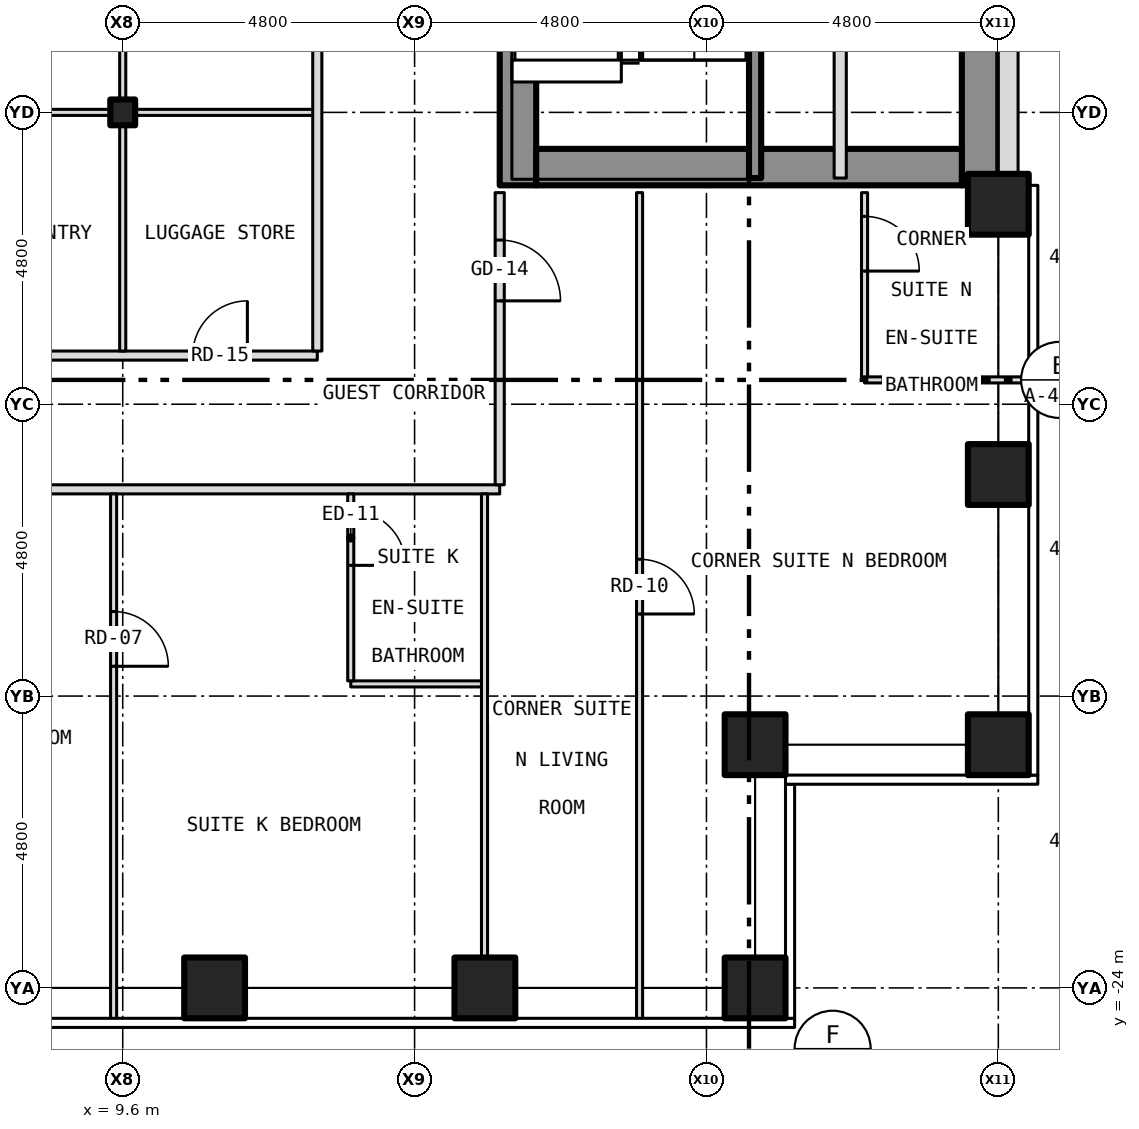
"""IFC4 building model, lengths in metres.
Left out: names, types, materials, properties, quantities, classifications, styles, units other than length and angle.
Written with IfcOpenShell. Run it as: python <this file> out.ifc"""

import sys

from ifc_helpers import new_model, si_unit, direction, frame, frame_2d, origin, origin_2d, place, context, subcontext, project, spatial, rectangle, hollow_rectangle, i_section, extrude, element, fill, save


model = new_model("IFC4")
c1 = context("Model", 3, precision=1e-05, world=origin(), true_north=direction((0.0, 1.0)))
c2 = subcontext(c1, "Body", "Model", "MODEL_VIEW")
j1 = project(units=[si_unit("LENGTHUNIT", "METRE"), si_unit("PLANEANGLEUNIT", "RADIAN")], contexts=[c1])
p1 = place(None, origin())
s1 = spatial("IfcSite", under=j1, at=p1, CompositionType="ELEMENT")
p2 = place(p1, origin())
s2 = spatial("IfcBuilding", under=s1, at=p2, CompositionType="ELEMENT")
p3 = place(p2, frame((0.0, 0.0, 56.5)))
s3 = spatial("IfcBuildingStorey", under=s2, at=p3, CompositionType="ELEMENT", Elevation=56.5)
for number, where, z_axis, x_axis in (
    (1, (11.111, -24.0, -0.15), (0.0, 0.0, 1.0), (1.0, 0.0, 0.0)),
    (2, (15.556, -24.0, -0.15), (0.0, 0.0, 1.0), (1.0, 0.0, 0.0)),
    (3, (20.0, -24.0, -0.15), (0.0, 0.0, 1.0), (1.0, 0.0, 0.0)),
    (4, (24.0, -20.0, -0.15), (0.0, 0.0, 1.0), (1.0, 0.0, 0.0)),
    (5, (24.0, -15.556, -0.15), (0.0, 0.0, 1.0), (1.0, 0.0, 0.0)),
    (6, (24.0, -11.111, -0.15), (0.0, 0.0, 1.0), (1.0, 0.0, 0.0)),
    (7, (20.0, -20.0, -0.15), (0.0, 0.0, 1.0), (1.0, 0.0, 0.0)),
):
    element("IfcColumn", number, at=place(p3, frame(where, z_axis=z_axis, x_axis=x_axis)), inside=s3, PredefinedType="COLUMN", context=c2, shape_type="SweptSolid", body=[
        extrude(hollow_rectangle(XDim=1.0, YDim=1.0, WallThickness=0.06, at=origin_2d()), origin(), (0.0, 0.0, 1.0), 3.5),
    ])
p4 = place(p3, frame((9.6, -9.6, -0.15), z_axis=(0.0, 0.0, 1.0), x_axis=(1.0, 0.0, 0.0)))
e8 = element("IfcColumn", 8, at=p4, inside=s3, PredefinedType="COLUMN", context=c2, shape_type="SweptSolid", body=[
    extrude(i_section(OverallWidth=0.409, OverallDepth=0.424, WebThickness=0.033, FlangeThickness=0.052, at=origin_2d()), origin(), (0.0, 0.0, 1.0), 3.5),
])
p5 = place(p3, frame((16.1, -10.8, 0.0), z_axis=(0.0, 0.0, 1.0), x_axis=(0.0, 1.0, 0.0)))
e9 = element("IfcWall", 9, at=p5, inside=s3, PredefinedType="SHEAR", context=c2, shape_type="SweptSolid", body=[
    extrude(rectangle(XDim=21.6, YDim=0.6, at=frame_2d((10.8, 0.0))), origin(), (0.0, 0.0, 1.0), 3.25),
])
p6 = place(p5, frame((9.4, 0.0, 0.0)))
e10 = element("IfcOpeningElement", 10, at=p6, cuts=e9, PredefinedType="OPENING", context=c2, shape_type="SweptSolid", body=[
    extrude(rectangle(XDim=1.1, YDim=2.1, at=frame_2d((0.55, 1.05))), frame((0.0, 0.312, 0.0), z_axis=(0.0, -1.0, 0.0), x_axis=(1.0, 0.0, 0.0)), (0.0, 0.0, 1.0), 0.624),
])
p7 = place(p5, frame((11.5, 0.0, 0.0)))
e11 = element("IfcOpeningElement", 11, at=p7, cuts=e9, PredefinedType="OPENING", context=c2, shape_type="SweptSolid", body=[
    extrude(rectangle(XDim=1.1, YDim=2.1, at=frame_2d((0.55, 1.05))), frame((0.0, 0.312, 0.0), z_axis=(0.0, -1.0, 0.0), x_axis=(1.0, 0.0, 0.0)), (0.0, 0.0, 1.0), 0.624),
])
p8 = place(p5, frame((13.6, 0.0, 0.0)))
e12 = element("IfcOpeningElement", 12, at=p8, cuts=e9, PredefinedType="OPENING", context=c2, shape_type="SweptSolid", body=[
    extrude(rectangle(XDim=1.1, YDim=2.1, at=frame_2d((0.55, 1.05))), frame((0.0, 0.312, 0.0), z_axis=(0.0, -1.0, 0.0), x_axis=(1.0, 0.0, 0.0)), (0.0, 0.0, 1.0), 0.624),
])
p9 = place(p5, frame((15.7, 0.0, 0.0)))
e13 = element("IfcOpeningElement", 13, at=p9, cuts=e9, PredefinedType="OPENING", context=c2, shape_type="SweptSolid", body=[
    extrude(rectangle(XDim=1.1, YDim=2.1, at=frame_2d((0.55, 1.05))), frame((0.0, 0.312, 0.0), z_axis=(0.0, -1.0, 0.0), x_axis=(1.0, 0.0, 0.0)), (0.0, 0.0, 1.0), 0.624),
])
p10 = place(p5, frame((17.8, 0.0, 0.0)))
e14 = element("IfcOpeningElement", 14, at=p10, cuts=e9, PredefinedType="OPENING", context=c2, shape_type="SweptSolid", body=[
    extrude(rectangle(XDim=1.1, YDim=2.1, at=frame_2d((0.55, 1.05))), frame((0.0, 0.312, 0.0), z_axis=(0.0, -1.0, 0.0), x_axis=(1.0, 0.0, 0.0)), (0.0, 0.0, 1.0), 0.624),
])
p11 = place(p5, frame((5.642, 0.0, 0.0)))
e15 = element("IfcOpeningElement", 15, at=p11, cuts=e9, PredefinedType="OPENING", context=c2, shape_type="SweptSolid", body=[
    extrude(rectangle(XDim=1.1, YDim=2.1, at=frame_2d((0.55, 1.05))), frame((0.0, 0.312, 0.0), z_axis=(0.0, -1.0, 0.0), x_axis=(1.0, 0.0, 0.0)), (0.0, 0.0, 1.0), 0.624),
])
p12 = place(p5, frame((7.5, 0.0, 0.0)))
e16 = element("IfcOpeningElement", 16, at=p12, cuts=e9, PredefinedType="OPENING", context=c2, shape_type="SweptSolid", body=[
    extrude(rectangle(XDim=1.1, YDim=2.1, at=frame_2d((0.55, 1.05))), frame((0.0, 0.312, 0.0), z_axis=(0.0, -1.0, 0.0), x_axis=(1.0, 0.0, 0.0)), (0.0, 0.0, 1.0), 0.624),
])
p13 = place(p3, frame((23.7, -10.8, 0.0), z_axis=(0.0, 0.0, 1.0), x_axis=(0.0, 1.0, 0.0)))
e17 = element("IfcWall", 17, at=p13, inside=s3, PredefinedType="SHEAR", context=c2, shape_type="SweptSolid", body=[
    extrude(rectangle(XDim=21.6, YDim=0.6, at=frame_2d((10.8, 0.0))), origin(), (0.0, 0.0, 1.0), 3.25),
])
p14 = place(p3, frame((16.4, -10.5, 0.0), z_axis=(0.0, 0.0, 1.0), x_axis=(1.0, 0.0, 0.0)))
e18 = element("IfcWall", 18, at=p14, inside=s3, PredefinedType="SHEAR", context=c2, shape_type="SweptSolid", body=[
    extrude(rectangle(XDim=7.0, YDim=0.6, at=frame_2d((3.5, 0.0))), origin(), (0.0, 0.0, 1.0), 3.25),
])
p15 = place(p3, frame((24.163, -10.8, 0.0), z_axis=(0.0, 0.0, 1.0), x_axis=(0.0, 1.0, 0.0)))
e19 = element("IfcWall", 19, at=p15, inside=s3, PredefinedType="SOLIDWALL", context=c2, shape_type="SweptSolid", body=[
    extrude(rectangle(XDim=21.6, YDim=0.325, at=frame_2d((10.8, 0.0))), origin(), (0.0, 0.0, 1.0), 3.5),
])
p16 = place(p15, frame((2.95, 0.0, 1.0)))
e20 = element("IfcOpeningElement", 20, at=p16, cuts=e19, PredefinedType="OPENING", context=c2, shape_type="SweptSolid", body=[
    extrude(rectangle(XDim=0.6, YDim=1.5, at=frame_2d((0.3, 0.75))), frame((0.0, 0.175, 0.0), z_axis=(0.0, -1.0, 0.0), x_axis=(1.0, 0.0, 0.0)), (0.0, 0.0, 1.0), 0.349),
])
p17 = place(p3, frame((13.35, -19.0, 0.0), z_axis=(0.0, 0.0, 1.0), x_axis=(1.0, 0.0, 0.0)))
e21 = element("IfcWall", 21, at=p17, inside=s3, PredefinedType="PARTITIONING", context=c2, shape_type="SweptSolid", body=[
    extrude(rectangle(XDim=2.2, YDim=0.1, at=frame_2d((1.1, 0.0))), origin(), (0.0, 0.0, 1.0), 3.35),
])
p18 = place(p3, frame((-15.8, -15.8, 0.0), z_axis=(0.0, 0.0, 1.0), x_axis=(1.0, 0.0, 0.0)))
e22 = element("IfcWall", 22, at=p18, inside=s3, PredefinedType="PARTITIONING", context=c2, shape_type="SweptSolid", body=[
    extrude(rectangle(XDim=31.6, YDim=0.15, at=frame_2d((15.8, 0.0))), origin(), (0.0, 0.0, 1.0), 3.35),
])
p19 = place(p18, frame((3.067, 0.0, 0.0)))
e23 = element("IfcOpeningElement", 23, at=p19, cuts=e22, PredefinedType="OPENING", context=c2, shape_type="SweptSolid", body=[
    extrude(rectangle(XDim=1.0, YDim=2.1, at=frame_2d((0.5, 1.05))), frame((0.0, 0.087, 0.0), z_axis=(0.0, -1.0, 0.0), x_axis=(1.0, 0.0, 0.0)), (0.0, 0.0, 1.0), 0.174),
])
p20 = place(p18, frame((5.311, 0.0, 0.0)))
e24 = element("IfcOpeningElement", 24, at=p20, cuts=e22, PredefinedType="OPENING", context=c2, shape_type="SweptSolid", body=[
    extrude(rectangle(XDim=1.0, YDim=2.1, at=frame_2d((0.5, 1.05))), frame((0.0, 0.087, 0.0), z_axis=(0.0, -1.0, 0.0), x_axis=(1.0, 0.0, 0.0)), (0.0, 0.0, 1.0), 0.174),
])
p21 = place(p18, frame((9.756, 0.0, 0.0)))
e25 = element("IfcOpeningElement", 25, at=p21, cuts=e22, PredefinedType="OPENING", context=c2, shape_type="SweptSolid", body=[
    extrude(rectangle(XDim=1.0, YDim=2.1, at=frame_2d((0.5, 1.05))), frame((0.0, 0.087, 0.0), z_axis=(0.0, -1.0, 0.0), x_axis=(1.0, 0.0, 0.0)), (0.0, 0.0, 1.0), 0.174),
])
p22 = place(p18, frame((15.311, 0.0, 0.0)))
e26 = element("IfcOpeningElement", 26, at=p22, cuts=e22, PredefinedType="OPENING", context=c2, shape_type="SweptSolid", body=[
    extrude(rectangle(XDim=1.0, YDim=2.1, at=frame_2d((0.5, 1.05))), frame((0.0, 0.087, 0.0), z_axis=(0.0, -1.0, 0.0), x_axis=(1.0, 0.0, 0.0)), (0.0, 0.0, 1.0), 0.174),
])
p23 = place(p18, frame((22.245, 0.0, 0.0)))
e27 = element("IfcOpeningElement", 27, at=p23, cuts=e22, PredefinedType="OPENING", context=c2, shape_type="SweptSolid", body=[
    extrude(rectangle(XDim=1.0, YDim=2.1, at=frame_2d((0.5, 1.05))), frame((0.0, 0.087, 0.0), z_axis=(0.0, -1.0, 0.0), x_axis=(1.0, 0.0, 0.0)), (0.0, 0.0, 1.0), 0.174),
])
p24 = place(p3, frame((21.8, -14.0, 0.0), z_axis=(0.0, 0.0, 1.0), x_axis=(1.0, 0.0, 0.0)))
e28 = element("IfcWall", 28, at=p24, inside=s3, PredefinedType="PARTITIONING", context=c2, shape_type="SweptSolid", body=[
    extrude(rectangle(XDim=2.73, YDim=0.1, at=frame_2d((1.365, 0.0))), origin(), (0.0, 0.0, 1.0), 3.35),
])
p25 = place(p3, frame((6.3, -13.6, 0.0), z_axis=(0.0, 0.0, 1.0), x_axis=(1.0, 0.0, 0.0)))
e29 = element("IfcWall", 29, at=p25, inside=s3, PredefinedType="PARTITIONING", context=c2, shape_type="SweptSolid", body=[
    extrude(rectangle(XDim=6.5, YDim=0.15, at=frame_2d((3.25, 0.0))), origin(), (0.0, 0.0, 1.0), 3.35),
])
p26 = place(p25, frame((4.45, 0.0, 0.0)))
e30 = element("IfcOpeningElement", 30, at=p26, cuts=e29, PredefinedType="OPENING", context=c2, shape_type="SweptSolid", body=[
    extrude(rectangle(XDim=0.9, YDim=2.1, at=frame_2d((0.45, 1.05))), frame((0.0, 0.087, 0.0), z_axis=(0.0, -1.0, 0.0), x_axis=(1.0, 0.0, 0.0)), (0.0, 0.0, 1.0), 0.174),
])
p27 = place(p3, frame((6.3, -9.6, 0.0), z_axis=(0.0, 0.0, 1.0), x_axis=(1.0, 0.0, 0.0)))
e31 = element("IfcWall", 31, at=p27, inside=s3, PredefinedType="PARTITIONING", context=c2, shape_type="SweptSolid", body=[
    extrude(rectangle(XDim=3.096, YDim=0.1, at=frame_2d((1.548, 0.0))), origin(), (0.0, 0.0, 1.0), 2.728),
])
p28 = place(p3, frame((9.396, -9.6, 0.0), z_axis=(0.0, 0.0, 1.0), x_axis=(1.0, 0.0, 0.0)))
e32 = element("IfcWall", 32, at=p28, inside=s3, PredefinedType="PARTITIONING", context=c2, shape_type="SweptSolid", body=[
    extrude(rectangle(XDim=0.408, YDim=0.1, at=frame_2d((0.204, 0.0))), origin(), (0.0, 0.0, 1.0), 3.35),
])
p29 = place(p3, frame((9.804, -9.6, 0.0), z_axis=(0.0, 0.0, 1.0), x_axis=(1.0, 0.0, 0.0)))
e33 = element("IfcWall", 33, at=p29, inside=s3, PredefinedType="PARTITIONING", context=c2, shape_type="SweptSolid", body=[
    extrude(rectangle(XDim=2.996, YDim=0.1, at=frame_2d((1.498, 0.0))), origin(), (0.0, 0.0, 1.0), 2.728),
])
p30 = place(p3, frame((9.45, -24.53, 0.0), z_axis=(0.0, 0.0, 1.0), x_axis=(0.0, 1.0, 0.0)))
e34 = element("IfcWall", 34, at=p30, inside=s3, PredefinedType="PARTITIONING", context=c2, shape_type="SweptSolid", body=[
    extrude(rectangle(XDim=8.655, YDim=0.1, at=frame_2d((4.328, 0.0))), origin(), (0.0, 0.0, 1.0), 2.728),
])
p31 = place(p30, frame((5.82, 0.0, 0.0)))
e35 = element("IfcOpeningElement", 35, at=p31, cuts=e34, PredefinedType="OPENING", context=c2, shape_type="SweptSolid", body=[
    extrude(rectangle(XDim=0.9, YDim=2.1, at=frame_2d((0.45, 1.05))), frame((0.0, 0.062, 0.0), z_axis=(0.0, -1.0, 0.0), x_axis=(1.0, 0.0, 0.0)), (0.0, 0.0, 1.0), 0.124),
])
p32 = place(p3, frame((9.6, -13.525, 0.0), z_axis=(0.0, 0.0, 1.0), x_axis=(0.0, 1.0, 0.0)))
e36 = element("IfcWall", 36, at=p32, inside=s3, PredefinedType="PARTITIONING", context=c2, shape_type="SweptSolid", body=[
    extrude(rectangle(XDim=3.875, YDim=0.1, at=frame_2d((1.938, 0.0))), origin(), (0.0, 0.0, 1.0), 2.728),
])
p33 = place(p3, frame((9.6, -9.55, 0.0), z_axis=(0.0, 0.0, 1.0), x_axis=(0.0, 1.0, 0.0)))
e37 = element("IfcWall", 37, at=p33, inside=s3, PredefinedType="PARTITIONING", context=c2, shape_type="SweptSolid", body=[
    extrude(rectangle(XDim=9.5, YDim=0.1, at=frame_2d((4.75, 0.0))), origin(), (0.0, 0.0, 1.0), 2.728),
])
p34 = place(p3, frame((12.8, -13.525, 0.0), z_axis=(0.0, 0.0, 1.0), x_axis=(0.0, 1.0, 0.0)))
e38 = element("IfcWall", 38, at=p34, inside=s3, PredefinedType="PARTITIONING", context=c2, shape_type="SweptSolid", body=[
    extrude(rectangle(XDim=11.525, YDim=0.15, at=frame_2d((5.762, 0.0))), origin(), (0.0, 0.0, 1.0), 3.35),
])
p35 = place(p34, frame((7.325, 0.0, 0.0)))
e39 = element("IfcOpeningElement", 39, at=p35, cuts=e38, PredefinedType="OPENING", context=c2, shape_type="SweptSolid", body=[
    extrude(rectangle(XDim=0.9, YDim=2.1, at=frame_2d((0.45, 1.05))), frame((0.0, 0.087, 0.0), z_axis=(0.0, -1.0, 0.0), x_axis=(1.0, 0.0, 0.0)), (0.0, 0.0, 1.0), 0.174),
])
p36 = place(p3, frame((13.35, -18.95, 0.0), z_axis=(0.0, 0.0, 1.0), x_axis=(0.0, 1.0, 0.0)))
e40 = element("IfcWall", 40, at=p36, inside=s3, PredefinedType="PARTITIONING", context=c2, shape_type="SweptSolid", body=[
    extrude(rectangle(XDim=3.075, YDim=0.1, at=frame_2d((1.538, 0.0))), origin(), (0.0, 0.0, 1.0), 3.35),
])
p37 = place(p36, frame((1.9, 0.0, 0.0)))
e41 = element("IfcOpeningElement", 41, at=p37, cuts=e40, PredefinedType="OPENING", context=c2, shape_type="SweptSolid", body=[
    extrude(rectangle(XDim=0.9, YDim=2.1, at=frame_2d((0.45, 1.05))), frame((0.0, 0.062, 0.0), z_axis=(0.0, -1.0, 0.0), x_axis=(1.0, 0.0, 0.0)), (0.0, 0.0, 1.0), 0.124),
])
p38 = place(p3, frame((15.55, -23.88, 0.0), z_axis=(0.0, 0.0, 1.0), x_axis=(0.0, 1.0, 0.0)))
e42 = element("IfcWall", 42, at=p38, inside=s3, PredefinedType="PARTITIONING", context=c2, shape_type="SweptSolid", body=[
    extrude(rectangle(XDim=8.005, YDim=0.1, at=frame_2d((4.002, 0.0))), origin(), (0.0, 0.0, 1.0), 3.35),
])
p39 = place(p3, frame((15.8, -15.725, 0.0), z_axis=(0.0, 0.0, 1.0), x_axis=(0.0, 1.0, 0.0)))
e43 = element("IfcWall", 43, at=p39, inside=s3, PredefinedType="PARTITIONING", context=c2, shape_type="SweptSolid", body=[
    extrude(rectangle(XDim=4.805, YDim=0.15, at=frame_2d((2.403, 0.0))), origin(), (0.0, 0.0, 1.0), 3.35),
])
p40 = place(p39, frame((3.025, 0.0, 0.0)))
e44 = element("IfcOpeningElement", 44, at=p40, cuts=e43, PredefinedType="OPENING", context=c2, shape_type="SweptSolid", body=[
    extrude(rectangle(XDim=1.0, YDim=2.1, at=frame_2d((0.5, 1.05))), frame((0.0, 0.087, 0.0), z_axis=(0.0, -1.0, 0.0), x_axis=(1.0, 0.0, 0.0)), (0.0, 0.0, 1.0), 0.174),
])
p41 = place(p3, frame((18.1, -24.53, 0.0), z_axis=(0.0, 0.0, 1.0), x_axis=(0.0, 1.0, 0.0)))
e45 = element("IfcWall", 45, at=p41, inside=s3, PredefinedType="PARTITIONING", context=c2, shape_type="SweptSolid", body=[
    extrude(rectangle(XDim=13.61, YDim=0.1, at=frame_2d((6.805, 0.0))), origin(), (0.0, 0.0, 1.0), 3.35),
])
p42 = place(p41, frame((6.68, 0.0, 0.0)))
e46 = element("IfcOpeningElement", 46, at=p42, cuts=e45, PredefinedType="OPENING", context=c2, shape_type="SweptSolid", body=[
    extrude(rectangle(XDim=0.9, YDim=2.1, at=frame_2d((0.45, 1.05))), frame((0.0, 0.062, 0.0), z_axis=(0.0, -1.0, 0.0), x_axis=(1.0, 0.0, 0.0)), (0.0, 0.0, 1.0), 0.124),
])
p43 = place(p3, frame((20.0, -10.68, 0.0), z_axis=(0.0, 0.0, 1.0), x_axis=(0.0, 1.0, 0.0)))
e47 = element("IfcWall", 47, at=p43, inside=s3, PredefinedType="SHEAR", context=c2, shape_type="SweptSolid", body=[
    extrude(rectangle(XDim=6.98, YDim=0.2, at=frame_2d((3.49, 0.0))), origin(), (0.0, 0.0, 1.0), 3.25),
])
p44 = place(p3, frame((21.4, -10.68, 0.0), z_axis=(0.0, 0.0, 1.0), x_axis=(0.0, 1.0, 0.0)))
e48 = element("IfcWall", 48, at=p44, inside=s3, PredefinedType="PARTITIONING", context=c2, shape_type="SweptSolid", body=[
    extrude(rectangle(XDim=8.68, YDim=0.2, at=frame_2d((4.34, 0.0))), origin(), (0.0, 0.0, 1.0), 3.25),
])
p45 = place(p44, frame((3.88, 0.0, 0.0)))
e49 = element("IfcOpeningElement", 49, at=p45, cuts=e48, PredefinedType="OPENING", context=c2, shape_type="SweptSolid", body=[
    extrude(rectangle(XDim=0.9, YDim=2.1, at=frame_2d((0.45, 1.05))), frame((0.0, 0.112, 0.0), z_axis=(0.0, -1.0, 0.0), x_axis=(1.0, 0.0, 0.0)), (0.0, 0.0, 1.0), 0.224),
])
p46 = place(p3, frame((21.8, -13.95, 0.0), z_axis=(0.0, 0.0, 1.0), x_axis=(0.0, 1.0, 0.0)))
e50 = element("IfcWall", 50, at=p46, inside=s3, PredefinedType="PARTITIONING", context=c2, shape_type="SweptSolid", body=[
    extrude(rectangle(XDim=3.03, YDim=0.1, at=frame_2d((1.515, 0.0))), origin(), (0.0, 0.0, 1.0), 3.35),
])
p47 = place(p46, frame((1.74, 0.0, 0.0)))
e51 = element("IfcOpeningElement", 51, at=p47, cuts=e50, PredefinedType="OPENING", context=c2, shape_type="SweptSolid", body=[
    extrude(rectangle(XDim=0.9, YDim=2.1, at=frame_2d((0.45, 1.05))), frame((0.0, 0.062, 0.0), z_axis=(0.0, -1.0, 0.0), x_axis=(1.0, 0.0, 0.0)), (0.0, 0.0, 1.0), 0.124),
])
p48 = place(p31, origin())
e52 = element("IfcDoor", 52, at=p48, inside=s3, OperationType="SINGLE_SWING_LEFT", PredefinedType="DOOR", context=c2, shape_type="SweptSolid", body=[
    extrude(rectangle(XDim=0.9, YDim=2.1, at=frame_2d((0.45, 1.05))), frame((0.0, 0.025, 0.0), z_axis=(0.0, -1.0, 0.0), x_axis=(1.0, 0.0, 0.0)), (0.0, 0.0, 1.0), 0.05),
])
fill(e35, e52)
p49 = place(p37, origin())
e53 = element("IfcDoor", 53, at=p49, inside=s3, OperationType="SINGLE_SWING_LEFT", PredefinedType="DOOR", context=c2, shape_type="SweptSolid", body=[
    extrude(rectangle(XDim=0.9, YDim=2.1, at=frame_2d((0.45, 1.05))), frame((0.0, 0.025, 0.0), z_axis=(0.0, -1.0, 0.0), x_axis=(1.0, 0.0, 0.0)), (0.0, 0.0, 1.0), 0.05),
])
fill(e41, e53)
p50 = place(p40, origin())
e54 = element("IfcDoor", 54, at=p50, inside=s3, OperationType="SINGLE_SWING_LEFT", PredefinedType="DOOR", context=c2, shape_type="SweptSolid", body=[
    extrude(rectangle(XDim=1.0, YDim=2.1, at=frame_2d((0.5, 1.05))), frame((0.0, 0.025, 0.0), z_axis=(0.0, -1.0, 0.0), x_axis=(1.0, 0.0, 0.0)), (0.0, 0.0, 1.0), 0.05),
])
fill(e44, e54)
p51 = place(p42, origin())
e55 = element("IfcDoor", 55, at=p51, inside=s3, OperationType="SINGLE_SWING_LEFT", PredefinedType="DOOR", context=c2, shape_type="SweptSolid", body=[
    extrude(rectangle(XDim=0.9, YDim=2.1, at=frame_2d((0.45, 1.05))), frame((0.0, 0.025, 0.0), z_axis=(0.0, -1.0, 0.0), x_axis=(1.0, 0.0, 0.0)), (0.0, 0.0, 1.0), 0.05),
])
fill(e46, e55)
p52 = place(p47, origin())
e56 = element("IfcDoor", 56, at=p52, inside=s3, OperationType="SINGLE_SWING_LEFT", PredefinedType="DOOR", context=c2, shape_type="SweptSolid", body=[
    extrude(rectangle(XDim=0.9, YDim=2.1, at=frame_2d((0.45, 1.05))), frame((0.0, 0.025, 0.0), z_axis=(0.0, -1.0, 0.0), x_axis=(1.0, 0.0, 0.0)), (0.0, 0.0, 1.0), 0.05),
])
fill(e51, e56)
p53 = place(p26, origin())
e57 = element("IfcDoor", 57, at=p53, inside=s3, OperationType="SINGLE_SWING_RIGHT", PredefinedType="DOOR", context=c2, shape_type="SweptSolid", body=[
    extrude(rectangle(XDim=0.9, YDim=2.1, at=frame_2d((0.45, 1.05))), frame((0.0, 0.025, 0.0), z_axis=(0.0, -1.0, 0.0), x_axis=(1.0, 0.0, 0.0)), (0.0, 0.0, 1.0), 0.05),
])
fill(e30, e57)
save(model, sys.argv[1])
